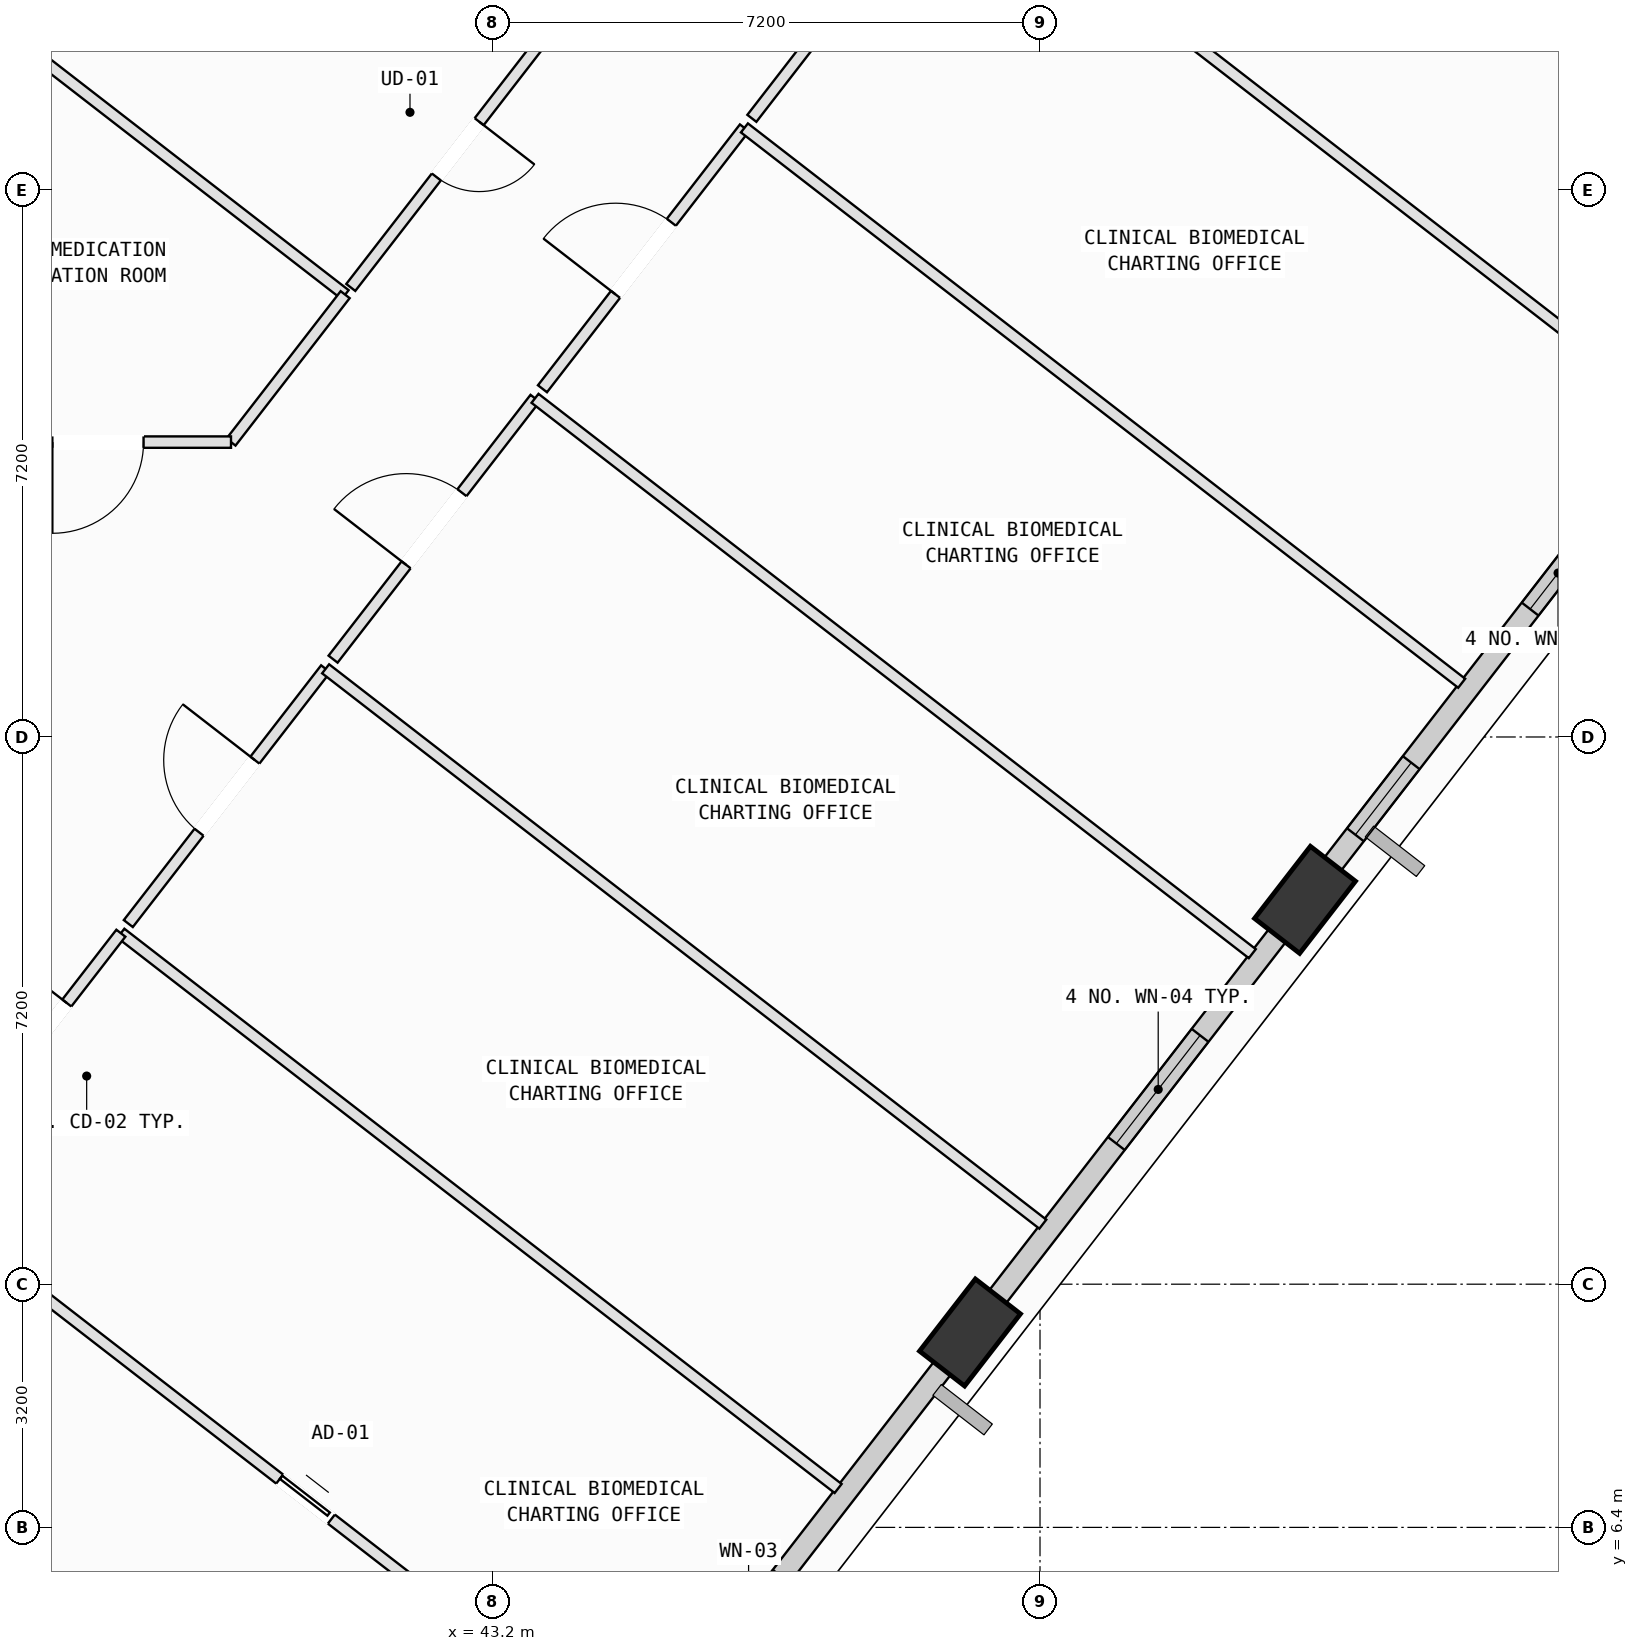
"""IFC4 building model, lengths in metres.
Left out: names, types, materials, properties, quantities, classifications, styles, units other than length and angle.
Written with IfcOpenShell. Run it as: python <this file> out.ifc"""

import sys

from ifc_helpers import new_model, si_unit, direction, frame, frame_2d, origin, origin_2d, place, context, subcontext, project, spatial, rectangle, extrude, element, fill, save


model = new_model("IFC4")
c1 = context("Model", 3, precision=1e-05, world=origin(), true_north=direction((0.0, 1.0)))
c2 = subcontext(c1, "Body", "Model", "MODEL_VIEW")
j1 = project(units=[si_unit("LENGTHUNIT", "METRE"), si_unit("PLANEANGLEUNIT", "RADIAN")], contexts=[c1])
p1 = place(None, origin())
s1 = spatial("IfcSite", under=j1, at=p1, CompositionType="ELEMENT")
p2 = place(p1, origin())
s2 = spatial("IfcBuilding", under=s1, at=p2, CompositionType="ELEMENT")
p3 = place(p2, frame((0.0, 0.0, 247.2)))
s3 = spatial("IfcBuildingStorey", under=s2, at=p3, CompositionType="ELEMENT", Elevation=247.2)
p4 = place(p3, frame((49.479, 8.964, 0.002), z_axis=(0.064782917664, 0.066060327308, 0.995710403046), x_axis=(-0.988350873328, -0.133455718622, 0.073158200899)))
e1 = element("IfcColumn", 1, at=p4, inside=s3, PredefinedType="COLUMN", context=c2, shape_type="SweptSolid", body=[
    extrude(rectangle(XDim=1.2, YDim=0.75, at=origin_2d()), origin(), (0.0, 0.0, 1.0), 4.014),
])
p5 = place(p3, frame((53.887, 14.657, 0.002), z_axis=(0.041177092046, 0.084057224827, 0.995609777998), x_axis=(-0.896107262055, -0.437623558587, 0.074009430899)))
e2 = element("IfcColumn", 2, at=p5, inside=s3, PredefinedType="COLUMN", context=c2, shape_type="SweptSolid", body=[
    extrude(rectangle(XDim=1.2, YDim=0.75, at=origin_2d()), origin(), (0.0, 0.0, 1.0), 4.014),
])
p6 = place(p3, frame((49.349, 8.796, 0.0), z_axis=(0.0, 0.0, 1.0), x_axis=(-0.612226167932, -0.790682691918, 0.0)))
e3 = element("IfcWall", 3, at=p6, inside=s3, PredefinedType="SOLIDWALL", context=c2, shape_type="SweptSolid", body=[
    extrude(rectangle(XDim=6.414, YDim=0.28, at=frame_2d((3.207, 0.0))), origin(), (0.0, 0.0, 1.0), 3.265),
])
p7 = place(p6, frame((3.846, 0.0, 0.75)))
e4 = element("IfcOpeningElement", 4, at=p7, cuts=e3, PredefinedType="OPENING", context=c2, shape_type="SweptSolid", body=[
    extrude(rectangle(XDim=1.4, YDim=1.85, at=frame_2d((0.7, 0.925))), frame((0.0, 0.15, 0.0), z_axis=(0.0, -1.0, 0.0), x_axis=(1.0, 0.0, 0.0)), (0.0, 0.0, 1.0), 0.3),
])
p8 = place(p3, frame((53.757, 14.49, 0.0), z_axis=(0.0, 0.0, 1.0), x_axis=(-0.612208546276, -0.790696336065, 0.0)))
e5 = element("IfcWall", 5, at=p8, inside=s3, PredefinedType="SOLIDWALL", context=c2, shape_type="SweptSolid", body=[
    extrude(rectangle(XDim=6.407, YDim=0.28, at=frame_2d((3.204, 0.0))), origin(), (0.0, 0.0, 1.0), 3.265),
])
p9 = place(p8, frame((2.043, 0.0, 0.75)))
e6 = element("IfcOpeningElement", 6, at=p9, cuts=e5, PredefinedType="OPENING", context=c2, shape_type="SweptSolid", body=[
    extrude(rectangle(XDim=1.8, YDim=2.05, at=frame_2d((0.9, 1.025))), frame((0.0, 0.15, 0.0), z_axis=(0.0, -1.0, 0.0), x_axis=(1.0, 0.0, 0.0)), (0.0, 0.0, 1.0), 0.3),
])
p10 = place(p3, frame((58.171, 20.191, 0.0), z_axis=(0.0, 0.0, 1.0), x_axis=(-0.612216921809, -0.790689851112, 0.0)))
e7 = element("IfcWall", 7, at=p10, inside=s3, PredefinedType="SOLIDWALL", context=c2, shape_type="SweptSolid", body=[
    extrude(rectangle(XDim=6.418, YDim=0.28, at=frame_2d((3.209, 0.0))), origin(), (0.0, 0.0, 1.0), 3.265),
])
p11 = place(p10, frame((0.96, 0.0, 0.75)))
e8 = element("IfcOpeningElement", 8, at=p11, cuts=e7, PredefinedType="OPENING", context=c2, shape_type="SweptSolid", body=[
    extrude(rectangle(XDim=1.2, YDim=1.75, at=frame_2d((0.6, 0.875))), frame((0.0, 0.15, 0.0), z_axis=(0.0, -1.0, 0.0), x_axis=(1.0, 0.0, 0.0)), (0.0, 0.0, 1.0), 0.3),
])
p12 = place(p10, frame((4.715, 0.0, 0.75)))
e9 = element("IfcOpeningElement", 9, at=p12, cuts=e7, PredefinedType="OPENING", context=c2, shape_type="SweptSolid", body=[
    extrude(rectangle(XDim=1.2, YDim=1.75, at=frame_2d((0.6, 0.875))), frame((0.0, 0.15, 0.0), z_axis=(0.0, -1.0, 0.0), x_axis=(1.0, 0.0, 0.0)), (0.0, 0.0, 1.0), 0.3),
])
p13 = place(p3, frame((35.163, 24.613, 0.0), z_axis=(0.0, 0.0, 1.0), x_axis=(0.612185484871, 0.790714191167, 0.0)))
e10 = element("IfcWall", 10, at=p13, inside=s3, PredefinedType="SOLIDWALL", context=c2, shape_type="SweptSolid", body=[
    extrude(rectangle(XDim=6.409, YDim=0.28, at=frame_2d((3.205, 0.0))), origin(), (0.0, 0.0, 1.0), 3.265),
])
p14 = place(p13, frame((3.847, 0.0, 0.75)))
e11 = element("IfcOpeningElement", 11, at=p14, cuts=e10, PredefinedType="OPENING", context=c2, shape_type="SweptSolid", body=[
    extrude(rectangle(XDim=1.2, YDim=1.75, at=frame_2d((0.6, 0.875))), frame((0.0, 0.15, 0.0), z_axis=(0.0, -1.0, 0.0), x_axis=(1.0, 0.0, 0.0)), (0.0, 0.0, 1.0), 0.3),
])
p15 = place(p3, frame((32.92, 7.26, 0.0), z_axis=(0.0, 0.0, 1.0), x_axis=(0.790650233598, -0.612268085164, 0.0)))
e12 = element("IfcWall", 12, at=p15, inside=s3, PredefinedType="PARTITIONING", context=c2, shape_type="SweptSolid", body=[
    extrude(rectangle(XDim=11.935, YDim=0.15, at=frame_2d((5.967, 0.0))), origin(), (0.0, 0.0, 1.0), 3.78),
])
p16 = place(p15, frame((5.537, 0.0, 0.0)))
e13 = element("IfcOpeningElement", 13, at=p16, cuts=e12, PredefinedType="OPENING", context=c2, shape_type="SweptSolid", body=[
    extrude(rectangle(XDim=0.86, YDim=2.06, at=frame_2d((0.43, 1.03))), frame((0.0, 0.085, 0.0), z_axis=(0.0, -1.0, 0.0), x_axis=(1.0, 0.0, 0.0)), (0.0, 0.0, 1.0), 0.17),
])
p17 = place(p3, frame((36.15, 10.324, 0.0), z_axis=(0.0, 0.0, 1.0), x_axis=(0.790670472716, -0.612241948559, 0.0)))
e14 = element("IfcWall", 14, at=p17, inside=s3, PredefinedType="PARTITIONING", context=c2, shape_type="SweptSolid", body=[
    extrude(rectangle(XDim=11.602, YDim=0.15, at=frame_2d((5.801, 0.0))), origin(), (0.0, 0.0, 1.0), 3.165),
])
p18 = place(p17, frame((5.371, 0.0, 0.0)))
e15 = element("IfcOpeningElement", 15, at=p18, cuts=e14, PredefinedType="OPENING", context=c2, shape_type="SweptSolid", body=[
    extrude(rectangle(XDim=0.86, YDim=2.06, at=frame_2d((0.43, 1.03))), frame((0.0, 0.085, 0.0), z_axis=(0.0, -1.0, 0.0), x_axis=(1.0, 0.0, 0.0)), (0.0, 0.0, 1.0), 0.17),
])
p19 = place(p3, frame((38.307, 14.218, 0.0), z_axis=(0.0, 0.0, 1.0), x_axis=(0.79073041553, -0.612164528502, 0.0)))
e16 = element("IfcWall", 16, at=p19, inside=s3, PredefinedType="PARTITIONING", context=c2, shape_type="SweptSolid", body=[
    extrude(rectangle(XDim=11.935, YDim=0.15, at=frame_2d((5.967, 0.0))), origin(), (0.0, 0.0, 1.0), 3.78),
])
p20 = place(p3, frame((36.15, 11.433, 0.0), z_axis=(0.0, 0.0, 1.0), x_axis=(0.612336732494, 0.790597069333, 0.0)))
e17 = element("IfcWall", 17, at=p20, inside=s3, PredefinedType="PARTITIONING", context=c2, shape_type="SweptSolid", body=[
    extrude(rectangle(XDim=3.522, YDim=0.15, at=frame_2d((1.761, 0.0))), origin(), (0.0, 0.0, 1.0), 3.78),
])
p21 = place(p20, frame((1.161, 0.0, 0.0)))
e18 = element("IfcOpeningElement", 18, at=p21, cuts=e17, PredefinedType="OPENING", context=c2, shape_type="SweptSolid", body=[
    extrude(rectangle(XDim=1.2, YDim=2.15, at=frame_2d((0.6, 1.075))), frame((0.0, 0.085, 0.0), z_axis=(0.0, -1.0, 0.0), x_axis=(1.0, 0.0, 0.0)), (0.0, 0.0, 1.0), 0.17),
])
p22 = place(p3, frame((38.405, 14.345, 0.0), z_axis=(0.0, 0.0, 1.0), x_axis=(0.612292812762, 0.790631084287, 0.0)))
e19 = element("IfcWall", 19, at=p22, inside=s3, PredefinedType="PARTITIONING", context=c2, shape_type="SweptSolid", body=[
    extrude(rectangle(XDim=4.24, YDim=0.15, at=frame_2d((2.12, 0.0))), origin(), (0.0, 0.0, 1.0), 3.78),
])
p23 = place(p22, frame((1.52, 0.0, 0.0)))
e20 = element("IfcOpeningElement", 20, at=p23, cuts=e19, PredefinedType="OPENING", context=c2, shape_type="SweptSolid", body=[
    extrude(rectangle(XDim=1.2, YDim=2.15, at=frame_2d((0.6, 1.075))), frame((0.0, 0.085, 0.0), z_axis=(0.0, -1.0, 0.0), x_axis=(1.0, 0.0, 0.0)), (0.0, 0.0, 1.0), 0.17),
])
p24 = place(p3, frame((41.001, 17.697, 0.0), z_axis=(0.0, 0.0, 1.0), x_axis=(0.790650233598, -0.612268085164, 0.0)))
e21 = element("IfcWall", 21, at=p24, inside=s3, PredefinedType="PARTITIONING", context=c2, shape_type="SweptSolid", body=[
    extrude(rectangle(XDim=11.935, YDim=0.15, at=frame_2d((5.967, 0.0))), origin(), (0.0, 0.0, 1.0), 3.78),
])
p25 = place(p3, frame((50.017, 9.283, 0.0), z_axis=(0.0, 0.0, 1.0), x_axis=(-0.612725467553, -0.79029583158, 0.0)))
e22 = element("IfcWall", 22, at=p25, inside=s3, PredefinedType="PARTITIONING", context=c2, shape_type="SweptSolid", body=[
    extrude(rectangle(XDim=0.793, YDim=0.15, at=frame_2d((0.396, 0.0))), origin(), (0.0, 0.0, 1.0), 3.265),
])
p26 = place(p3, frame((41.099, 17.824, 0.0), z_axis=(0.0, 0.0, 1.0), x_axis=(0.612151637576, 0.790740395208, 0.0)))
e23 = element("IfcWall", 23, at=p26, inside=s3, PredefinedType="PARTITIONING", context=c2, shape_type="SweptSolid", body=[
    extrude(rectangle(XDim=4.34, YDim=0.15, at=frame_2d((2.17, 0.0))), origin(), (0.0, 0.0, 1.0), 3.78),
])
p27 = place(p26, frame((1.57, 0.0, 0.0)))
e24 = element("IfcOpeningElement", 24, at=p27, cuts=e23, PredefinedType="OPENING", context=c2, shape_type="SweptSolid", body=[
    extrude(rectangle(XDim=1.2, YDim=2.15, at=frame_2d((0.6, 1.075))), frame((0.0, 0.085, 0.0), z_axis=(0.0, -1.0, 0.0), x_axis=(1.0, 0.0, 0.0)), (0.0, 0.0, 1.0), 0.17),
])
p28 = place(p3, frame((43.756, 21.256, 0.0), z_axis=(0.0, 0.0, 1.0), x_axis=(0.790680905168, -0.612228475492, 0.0)))
e25 = element("IfcWall", 25, at=p28, inside=s3, PredefinedType="PARTITIONING", context=c2, shape_type="SweptSolid", body=[
    extrude(rectangle(XDim=11.935, YDim=0.15, at=frame_2d((5.968, 0.0))), origin(), (0.0, 0.0, 1.0), 3.78),
])
p29 = place(p3, frame((43.854, 21.382, 0.0), z_axis=(0.0, 0.0, 1.0), x_axis=(0.612178865646, 0.790719315849, 0.0)))
e26 = element("IfcWall", 26, at=p29, inside=s3, PredefinedType="PARTITIONING", context=c2, shape_type="SweptSolid", body=[
    extrude(rectangle(XDim=4.34, YDim=0.15, at=frame_2d((2.17, 0.0))), origin(), (0.0, 0.0, 1.0), 3.78),
])
p30 = place(p29, frame((1.57, 0.0, 0.0)))
e27 = element("IfcOpeningElement", 27, at=p30, cuts=e26, PredefinedType="OPENING", context=c2, shape_type="SweptSolid", body=[
    extrude(rectangle(XDim=1.2, YDim=2.15, at=frame_2d((0.6, 1.075))), frame((0.0, 0.085, 0.0), z_axis=(0.0, -1.0, 0.0), x_axis=(1.0, 0.0, 0.0)), (0.0, 0.0, 1.0), 0.17),
])
p31 = place(p3, frame((46.511, 24.814, 0.0), z_axis=(0.0, 0.0, 1.0), x_axis=(0.790690807158, -0.612215687055, 0.0)))
e28 = element("IfcWall", 28, at=p31, inside=s3, PredefinedType="PARTITIONING", context=c2, shape_type="SweptSolid", body=[
    extrude(rectangle(XDim=11.935, YDim=0.15, at=frame_2d((5.968, 0.0))), origin(), (0.0, 0.0, 1.0), 3.78),
])
p32 = place(p3, frame((54.423, 14.975, 0.0), z_axis=(0.0, 0.0, 1.0), x_axis=(-0.611781103631, -0.79102710525, 0.0)))
e29 = element("IfcWall", 29, at=p32, inside=s3, PredefinedType="PARTITIONING", context=c2, shape_type="SweptSolid", body=[
    extrude(rectangle(XDim=0.791, YDim=0.15, at=frame_2d((0.396, 0.0))), origin(), (0.0, 0.0, 1.0), 3.265),
])
p33 = place(p3, frame((46.609, 24.94, 0.0), z_axis=(0.0, 0.0, 1.0), x_axis=(0.612186806235, 0.790713168141, 0.0)))
e30 = element("IfcWall", 30, at=p33, inside=s3, PredefinedType="PARTITIONING", context=c2, shape_type="SweptSolid", body=[
    extrude(rectangle(XDim=4.341, YDim=0.15, at=frame_2d((2.17, 0.0))), origin(), (0.0, 0.0, 1.0), 3.78),
])
p34 = place(p33, frame((1.57, 0.0, 0.0)))
e31 = element("IfcOpeningElement", 31, at=p34, cuts=e30, PredefinedType="OPENING", context=c2, shape_type="SweptSolid", body=[
    extrude(rectangle(XDim=1.2, YDim=2.15, at=frame_2d((0.6, 1.075))), frame((0.0, 0.085, 0.0), z_axis=(0.0, -1.0, 0.0), x_axis=(1.0, 0.0, 0.0)), (0.0, 0.0, 1.0), 0.17),
])
p35 = place(p3, frame((49.266, 28.372, 0.0), z_axis=(0.0, 0.0, 1.0), x_axis=(0.790648548944, -0.612270260631, 0.0)))
e32 = element("IfcWall", 32, at=p35, inside=s3, PredefinedType="PARTITIONING", context=c2, shape_type="SweptSolid", body=[
    extrude(rectangle(XDim=11.363, YDim=0.15, at=frame_2d((5.681, 0.0))), origin(), (0.0, 0.0, 1.0), 3.78),
])
p36 = place(p3, frame((36.574, 26.248, 0.0), z_axis=(0.0, 0.0, 1.0), x_axis=(0.790597576491, -0.612336077695, 0.0)))
e33 = element("IfcWall", 33, at=p36, inside=s3, PredefinedType="PARTITIONING", context=c2, shape_type="SweptSolid", body=[
    extrude(rectangle(XDim=5.925, YDim=0.15, at=frame_2d((2.962, 0.0))), origin(), (0.0, 0.0, 1.0), 3.78),
])
p37 = place(p3, frame((41.258, 22.62, 0.0), z_axis=(0.0, 0.0, 1.0), x_axis=(-0.612141082287, -0.790748566472, 0.0)))
e34 = element("IfcWall", 34, at=p37, inside=s3, PredefinedType="PARTITIONING", context=c2, shape_type="SweptSolid", body=[
    extrude(rectangle(XDim=2.454, YDim=0.15, at=frame_2d((1.227, 0.0))), origin(), (0.0, 0.0, 1.0), 3.78),
])
p38 = place(p3, frame((39.756, 20.68, 0.0), z_axis=(0.0, 0.0, 1.0), x_axis=(-1.0, 0.0, 0.0)))
e35 = element("IfcWall", 35, at=p38, inside=s3, PredefinedType="PARTITIONING", context=c2, shape_type="SweptSolid", body=[
    extrude(rectangle(XDim=3.501, YDim=0.15, at=frame_2d((1.75, 0.0))), origin(), (0.0, 0.0, 1.0), 3.415),
])
p39 = place(p38, frame((1.15, 0.0, 0.0)))
e36 = element("IfcOpeningElement", 36, at=p39, cuts=e35, PredefinedType="OPENING", context=c2, shape_type="SweptSolid", body=[
    extrude(rectangle(XDim=1.2, YDim=2.15, at=frame_2d((0.6, 1.075))), frame((0.0, 0.085, 0.0), z_axis=(0.0, -1.0, 0.0), x_axis=(1.0, 0.0, 0.0)), (0.0, 0.0, 1.0), 0.17),
])
p40 = place(p3, frame((44.147, 26.35, 0.0), z_axis=(0.0, 0.0, 1.0), x_axis=(-0.612273865453, -0.790645757393, 0.0)))
e37 = element("IfcWall", 37, at=p40, inside=s3, PredefinedType="PARTITIONING", context=c2, shape_type="SweptSolid", body=[
    extrude(rectangle(XDim=4.597, YDim=0.15, at=frame_2d((2.299, 0.0))), origin(), (0.0, 0.0, 1.0), 3.78),
])
p41 = place(p40, frame((1.839, 0.0, 0.0)))
e38 = element("IfcOpeningElement", 38, at=p41, cuts=e37, PredefinedType="OPENING", context=c2, shape_type="SweptSolid", body=[
    extrude(rectangle(XDim=0.92, YDim=2.1, at=frame_2d((0.46, 1.05))), frame((0.0, 0.085, 0.0), z_axis=(0.0, -1.0, 0.0), x_axis=(1.0, 0.0, 0.0)), (0.0, 0.0, 1.0), 0.17),
])
p42 = place(p9, origin())
e39 = element("IfcWindow", 39, at=p42, inside=s3, PartitioningType="SINGLE_PANEL", PredefinedType="WINDOW", context=c2, shape_type="SweptSolid", body=[
    extrude(rectangle(XDim=1.8, YDim=2.05, at=frame_2d((0.9, 1.025))), frame((0.0, 0.03, 0.0), z_axis=(0.0, -1.0, 0.0), x_axis=(1.0, 0.0, 0.0)), (0.0, 0.0, 1.0), 0.06),
])
fill(e6, e39)
p43 = place(p11, origin())
e40 = element("IfcWindow", 40, at=p43, inside=s3, PartitioningType="SINGLE_PANEL", PredefinedType="WINDOW", context=c2, shape_type="SweptSolid", body=[
    extrude(rectangle(XDim=1.2, YDim=1.75, at=frame_2d((0.6, 0.875))), frame((0.0, 0.03, 0.0), z_axis=(0.0, -1.0, 0.0), x_axis=(1.0, 0.0, 0.0)), (0.0, 0.0, 1.0), 0.06),
])
fill(e8, e40)
p44 = place(p12, origin())
e41 = element("IfcWindow", 41, at=p44, inside=s3, PartitioningType="SINGLE_PANEL", PredefinedType="WINDOW", context=c2, shape_type="SweptSolid", body=[
    extrude(rectangle(XDim=1.2, YDim=1.75, at=frame_2d((0.6, 0.875))), frame((0.0, 0.03, 0.0), z_axis=(0.0, -1.0, 0.0), x_axis=(1.0, 0.0, 0.0)), (0.0, 0.0, 1.0), 0.06),
])
fill(e9, e41)
p45 = place(p21, origin())
e42 = element("IfcDoor", 42, at=p45, inside=s3, OperationType="SINGLE_SWING_RIGHT", PredefinedType="DOOR", context=c2, shape_type="SweptSolid", body=[
    extrude(rectangle(XDim=1.2, YDim=2.15, at=frame_2d((0.6, 1.075))), frame((0.0, 0.025, 0.0), z_axis=(0.0, -1.0, 0.0), x_axis=(1.0, 0.0, 0.0)), (0.0, 0.0, 1.0), 0.05),
])
fill(e18, e42)
p46 = place(p23, origin())
e43 = element("IfcDoor", 43, at=p46, inside=s3, OperationType="SINGLE_SWING_RIGHT", PredefinedType="DOOR", context=c2, shape_type="SweptSolid", body=[
    extrude(rectangle(XDim=1.2, YDim=2.15, at=frame_2d((0.6, 1.075))), frame((0.0, 0.025, 0.0), z_axis=(0.0, -1.0, 0.0), x_axis=(1.0, 0.0, 0.0)), (0.0, 0.0, 1.0), 0.05),
])
fill(e20, e43)
p47 = place(p27, origin())
e44 = element("IfcDoor", 44, at=p47, inside=s3, OperationType="SINGLE_SWING_LEFT", PredefinedType="DOOR", context=c2, shape_type="SweptSolid", body=[
    extrude(rectangle(XDim=1.2, YDim=2.15, at=frame_2d((0.6, 1.075))), frame((0.0, 0.025, 0.0), z_axis=(0.0, -1.0, 0.0), x_axis=(1.0, 0.0, 0.0)), (0.0, 0.0, 1.0), 0.05),
])
fill(e24, e44)
p48 = place(p30, origin())
e45 = element("IfcDoor", 45, at=p48, inside=s3, OperationType="SINGLE_SWING_LEFT", PredefinedType="DOOR", context=c2, shape_type="SweptSolid", body=[
    extrude(rectangle(XDim=1.2, YDim=2.15, at=frame_2d((0.6, 1.075))), frame((0.0, 0.025, 0.0), z_axis=(0.0, -1.0, 0.0), x_axis=(1.0, 0.0, 0.0)), (0.0, 0.0, 1.0), 0.05),
])
fill(e27, e45)
p49 = place(p39, origin())
e46 = element("IfcDoor", 46, at=p49, inside=s3, OperationType="SINGLE_SWING_RIGHT", PredefinedType="DOOR", context=c2, shape_type="SweptSolid", body=[
    extrude(rectangle(XDim=1.2, YDim=2.15, at=frame_2d((0.6, 1.075))), frame((0.0, 0.025, 0.0), z_axis=(0.0, -1.0, 0.0), x_axis=(1.0, 0.0, 0.0)), (0.0, 0.0, 1.0), 0.05),
])
fill(e36, e46)
p50 = place(p41, origin())
e47 = element("IfcDoor", 47, at=p50, inside=s3, OperationType="SINGLE_SWING_LEFT", PredefinedType="DOOR", context=c2, shape_type="SweptSolid", body=[
    extrude(rectangle(XDim=0.92, YDim=2.1, at=frame_2d((0.46, 1.05))), frame((0.0, 0.025, 0.0), z_axis=(0.0, -1.0, 0.0), x_axis=(1.0, 0.0, 0.0)), (0.0, 0.0, 1.0), 0.05),
])
fill(e38, e47)
p51 = place(p18, origin())
e48 = element("IfcDoor", 48, at=p51, inside=s3, OperationType="SLIDING_TO_LEFT", PredefinedType="DOOR", context=c2, shape_type="SweptSolid", body=[
    extrude(rectangle(XDim=0.86, YDim=2.06, at=frame_2d((0.43, 1.03))), frame((0.0, 0.025, 0.0), z_axis=(0.0, -1.0, 0.0), x_axis=(1.0, 0.0, 0.0)), (0.0, 0.0, 1.0), 0.05),
])
fill(e15, e48)
save(model, sys.argv[1])
